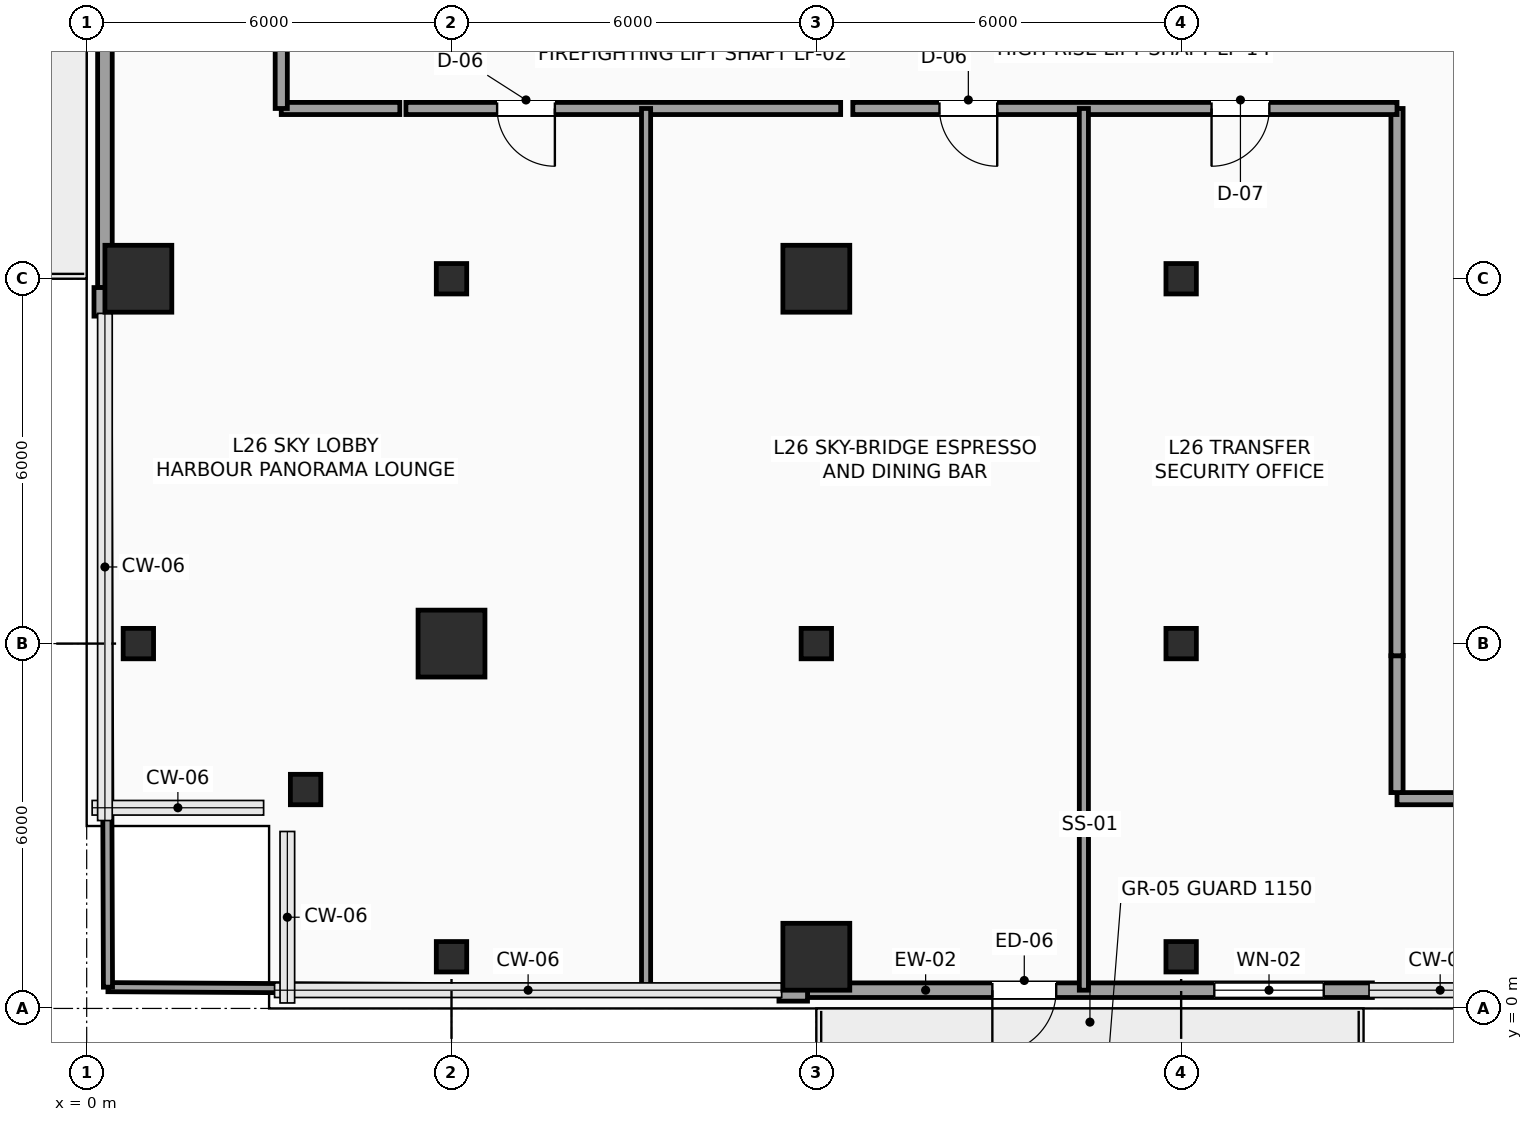
"""IFC4 building model, lengths in metres.
Left out: names, types, materials, properties, quantities, classifications, styles, units other than length and angle.
Written with IfcOpenShell. Run it as: python <this file> out.ifc"""

import sys

from ifc_helpers import new_model, si_unit, direction, frame, frame_2d, origin, origin_2d, place, context, subcontext, project, spatial, rectangle, hollow_rectangle, extrude, element, fill, save


model = new_model("IFC4")
c1 = context("Model", 3, precision=1e-05, world=origin(), true_north=direction((0.0, 1.0)))
c2 = subcontext(c1, "Body", "Model", "MODEL_VIEW")
j1 = project(units=[si_unit("LENGTHUNIT", "METRE"), si_unit("PLANEANGLEUNIT", "RADIAN")], contexts=[c1])
p1 = place(None, origin())
s1 = spatial("IfcSite", under=j1, at=p1, CompositionType="ELEMENT")
p2 = place(p1, origin())
s2 = spatial("IfcBuilding", under=s1, at=p2, CompositionType="ELEMENT")
p3 = place(p2, frame((0.0, 0.0, 110.85)))
s3 = spatial("IfcBuildingStorey", under=s2, at=p3, CompositionType="ELEMENT", Elevation=110.85)
for number, where, z_axis, x_axis in (
    (1, (3.6, 3.6, 0.0), (0.0, 0.0, 1.0), (1.0, 0.0, 0.0)),
    (2, (0.85, 6.0, 0.0), (0.0, 0.0, 1.0), (1.0, 0.0, 0.0)),
):
    element("IfcColumn", number, at=place(p3, frame(where, z_axis=z_axis, x_axis=x_axis)), inside=s3, PredefinedType="COLUMN", context=c2, shape_type="SweptSolid", body=[
        extrude(hollow_rectangle(XDim=0.5, YDim=0.5, WallThickness=0.025, InnerFilletRadius=0.025, OuterFilletRadius=0.04, at=origin_2d()), origin(), (0.0, 0.0, 1.0), 4.8),
    ])
p4 = place(p3, frame((0.85, 12.0, 0.0), z_axis=(0.0, 0.0, 1.0), x_axis=(1.0, 0.0, 0.0)))
e3 = element("IfcColumn", 3, at=p4, inside=s3, PredefinedType="COLUMN", context=c2, shape_type="SweptSolid", body=[
    extrude(rectangle(XDim=1.1, YDim=1.1, at=origin_2d()), origin(), (0.0, 0.0, 1.0), 4.8),
])
p5 = place(p3, frame((6.0, 0.85, 0.0), z_axis=(0.0, 0.0, 1.0), x_axis=(1.0, 0.0, 0.0)))
e4 = element("IfcColumn", 4, at=p5, inside=s3, PredefinedType="COLUMN", context=c2, shape_type="SweptSolid", body=[
    extrude(hollow_rectangle(XDim=0.5, YDim=0.5, WallThickness=0.025, InnerFilletRadius=0.025, OuterFilletRadius=0.04, at=origin_2d()), origin(), (0.0, 0.0, 1.0), 4.8),
])
p6 = place(p3, frame((6.0, 6.0, 0.0), z_axis=(0.0, 0.0, 1.0), x_axis=(1.0, 0.0, 0.0)))
e5 = element("IfcColumn", 5, at=p6, inside=s3, PredefinedType="COLUMN", context=c2, shape_type="SweptSolid", body=[
    extrude(rectangle(XDim=1.1, YDim=1.1, at=origin_2d()), origin(), (0.0, 0.0, 1.0), 4.8),
])
p7 = place(p3, frame((6.0, 12.0, 0.0), z_axis=(0.0, 0.0, 1.0), x_axis=(1.0, 0.0, 0.0)))
e6 = element("IfcColumn", 6, at=p7, inside=s3, PredefinedType="COLUMN", context=c2, shape_type="SweptSolid", body=[
    extrude(hollow_rectangle(XDim=0.5, YDim=0.5, WallThickness=0.025, InnerFilletRadius=0.025, OuterFilletRadius=0.04, at=origin_2d()), origin(), (0.0, 0.0, 1.0), 4.8),
])
p8 = place(p3, frame((12.0, 0.85, 0.0), z_axis=(0.0, 0.0, 1.0), x_axis=(1.0, 0.0, 0.0)))
e7 = element("IfcColumn", 7, at=p8, inside=s3, PredefinedType="COLUMN", context=c2, shape_type="SweptSolid", body=[
    extrude(rectangle(XDim=1.1, YDim=1.1, at=origin_2d()), origin(), (0.0, 0.0, 1.0), 4.8),
])
p9 = place(p3, frame((12.0, 6.0, 0.0), z_axis=(0.0, 0.0, 1.0), x_axis=(1.0, 0.0, 0.0)))
e8 = element("IfcColumn", 8, at=p9, inside=s3, PredefinedType="COLUMN", context=c2, shape_type="SweptSolid", body=[
    extrude(hollow_rectangle(XDim=0.5, YDim=0.5, WallThickness=0.025, InnerFilletRadius=0.025, OuterFilletRadius=0.04, at=origin_2d()), origin(), (0.0, 0.0, 1.0), 4.8),
])
p10 = place(p3, frame((12.0, 12.0, 0.0), z_axis=(0.0, 0.0, 1.0), x_axis=(1.0, 0.0, 0.0)))
e9 = element("IfcColumn", 9, at=p10, inside=s3, PredefinedType="COLUMN", context=c2, shape_type="SweptSolid", body=[
    extrude(rectangle(XDim=1.1, YDim=1.1, at=origin_2d()), origin(), (0.0, 0.0, 1.0), 4.8),
])
for number, where, z_axis, x_axis in (
    (10, (18.0, 0.85, 0.0), (0.0, 0.0, 1.0), (1.0, 0.0, 0.0)),
    (11, (18.0, 6.0, 0.0), (0.0, 0.0, 1.0), (1.0, 0.0, 0.0)),
    (12, (18.0, 12.0, 0.0), (0.0, 0.0, 1.0), (1.0, 0.0, 0.0)),
):
    element("IfcColumn", number, at=place(p3, frame(where, z_axis=z_axis, x_axis=x_axis)), inside=s3, PredefinedType="COLUMN", context=c2, shape_type="SweptSolid", body=[
        extrude(hollow_rectangle(XDim=0.5, YDim=0.5, WallThickness=0.025, InnerFilletRadius=0.025, OuterFilletRadius=0.04, at=origin_2d()), origin(), (0.0, 0.0, 1.0), 4.8),
    ])
p11 = place(p3, frame((21.145, 0.3, 0.0), z_axis=(0.0, 0.0, 1.0), x_axis=(-1.0, 0.0, 0.0)))
e13 = element("IfcWall", 13, at=p11, inside=s3, PredefinedType="SOLIDWALL", context=c2, shape_type="SweptSolid", body=[
    extrude(rectangle(XDim=9.29, YDim=0.24, at=frame_2d((4.645, 0.0))), origin(), (0.0, 0.0, 1.0), 4.575),
])
p12 = place(p11, frame((5.2, 0.0, 0.0)))
e14 = element("IfcOpeningElement", 14, at=p12, cuts=e13, PredefinedType="OPENING", context=c2, shape_type="SweptSolid", body=[
    extrude(rectangle(XDim=1.05, YDim=2.2, at=frame_2d((0.525, 1.1))), frame((0.0, 0.13, 0.0), z_axis=(0.0, -1.0, 0.0), x_axis=(1.0, 0.0, 0.0)), (0.0, 0.0, 1.0), 0.26),
])
p13 = place(p11, frame((0.8, 0.0, 0.85)))
e15 = element("IfcOpeningElement", 15, at=p13, cuts=e13, PredefinedType="OPENING", context=c2, shape_type="SweptSolid", body=[
    extrude(rectangle(XDim=1.8, YDim=2.1, at=frame_2d((0.9, 1.05))), frame((0.0, 0.13, 0.0), z_axis=(0.0, -1.0, 0.0), x_axis=(1.0, 0.0, 0.0)), (0.0, 0.0, 1.0), 0.26),
])
p14 = place(p3, frame((0.3, 11.855, 0.0), z_axis=(0.0, 0.0, 1.0), x_axis=(0.0, 1.0, 0.0)))
e16 = element("IfcWall", 16, at=p14, inside=s3, PredefinedType="SOLIDWALL", context=c2, shape_type="SweptSolid", body=[
    extrude(rectangle(XDim=9.29, YDim=0.24, at=frame_2d((4.645, 0.0))), origin(), (0.0, 0.0, 1.0), 4.575),
])
p15 = place(p14, frame((3.945, 0.0, 0.0)))
e17 = element("IfcOpeningElement", 17, at=p15, cuts=e16, PredefinedType="OPENING", context=c2, shape_type="SweptSolid", body=[
    extrude(rectangle(XDim=1.05, YDim=2.2, at=frame_2d((0.525, 1.1))), frame((0.0, 0.13, 0.0), z_axis=(0.0, -1.0, 0.0), x_axis=(1.0, 0.0, 0.0)), (0.0, 0.0, 1.0), 0.26),
])
p16 = place(p14, frame((6.8, 0.0, 0.85)))
e18 = element("IfcOpeningElement", 18, at=p16, cuts=e16, PredefinedType="OPENING", context=c2, shape_type="SweptSolid", body=[
    extrude(rectangle(XDim=1.8, YDim=2.1, at=frame_2d((0.9, 1.05))), frame((0.0, 0.13, 0.0), z_axis=(0.0, -1.0, 0.0), x_axis=(1.0, 0.0, 0.0)), (0.0, 0.0, 1.0), 0.26),
])
for number, where, z_axis, x_axis in (
    (19, (0.24, 11.385, 0.0), (0.0, 0.0, 1.0), (0.0, 1.0, 0.0)),
    (20, (11.855, 0.24, 0.0), (0.0, 0.0, 1.0), (-1.0, 0.0, 0.0)),
):
    element("IfcWall", number, at=place(p3, frame(where, z_axis=z_axis, x_axis=x_axis)), inside=s3, PredefinedType="SOLIDWALL", context=c2, shape_type="SweptSolid", body=[
        extrude(rectangle(XDim=0.47, YDim=0.24, at=frame_2d((0.235, 0.0))), origin(), (0.0, 0.0, 1.0), 4.575),
    ])
p17 = place(p3, frame((36.15, 3.45, 0.0), z_axis=(0.0, 0.0, 1.0), x_axis=(-1.0, 0.0, 0.0)))
e21 = element("IfcWall", 21, at=p17, inside=s3, PredefinedType="PARTITIONING", context=c2, shape_type="SweptSolid", body=[
    extrude(rectangle(XDim=14.6, YDim=0.2, at=frame_2d((7.3, 0.0))), origin(), (0.0, 0.0, 1.0), 4.117),
])
p18 = place(p3, frame((21.55, 3.55, 0.0), z_axis=(0.0, 0.0, 1.0), x_axis=(0.0, 1.0, 0.0)))
e22 = element("IfcWall", 22, at=p18, inside=s3, PredefinedType="PARTITIONING", context=c2, shape_type="SweptSolid", body=[
    extrude(rectangle(XDim=2.25, YDim=0.2, at=frame_2d((1.125, 0.0))), origin(), (0.0, 0.0, 1.0), 4.575),
])
p19 = place(p3, frame((21.55, 5.8, 0.0), z_axis=(0.0, 0.0, 1.0), x_axis=(0.0, 1.0, 0.0)))
e23 = element("IfcWall", 23, at=p19, inside=s3, PredefinedType="PARTITIONING", context=c2, shape_type="SweptSolid", body=[
    extrude(rectangle(XDim=9.0, YDim=0.2, at=frame_2d((4.5, 0.0))), origin(), (0.0, 0.0, 1.0), 4.575),
])
p20 = place(p3, frame((21.55, 14.8, 0.0), z_axis=(0.0, 0.0, 1.0), x_axis=(-1.0, 0.0, 0.0)))
e24 = element("IfcWall", 24, at=p20, inside=s3, PredefinedType="PARTITIONING", context=c2, shape_type="SweptSolid", body=[
    extrude(rectangle(XDim=8.95, YDim=0.2, at=frame_2d((4.475, 0.0))), origin(), (0.0, 0.0, 1.0), 4.117),
])
p21 = place(p20, frame((6.575, 0.0, 0.0)))
e25 = element("IfcOpeningElement", 25, at=p21, cuts=e24, PredefinedType="OPENING", context=c2, shape_type="SweptSolid", body=[
    extrude(rectangle(XDim=0.95, YDim=2.15, at=frame_2d((0.475, 1.075))), frame((0.0, 0.11, 0.0), z_axis=(0.0, -1.0, 0.0), x_axis=(1.0, 0.0, 0.0)), (0.0, 0.0, 1.0), 0.22),
])
p22 = place(p20, frame((2.1, 0.0, 0.0)))
e26 = element("IfcOpeningElement", 26, at=p22, cuts=e24, PredefinedType="OPENING", context=c2, shape_type="SweptSolid", body=[
    extrude(rectangle(XDim=0.95, YDim=2.15, at=frame_2d((0.475, 1.075))), frame((0.0, 0.11, 0.0), z_axis=(0.0, -1.0, 0.0), x_axis=(1.0, 0.0, 0.0)), (0.0, 0.0, 1.0), 0.22),
])
p23 = place(p3, frame((12.4, 14.8, 0.0), z_axis=(0.0, 0.0, 1.0), x_axis=(-1.0, 0.0, 0.0)))
e27 = element("IfcWall", 27, at=p23, inside=s3, PredefinedType="PARTITIONING", context=c2, shape_type="SweptSolid", body=[
    extrude(rectangle(XDim=7.15, YDim=0.2, at=frame_2d((3.575, 0.0))), origin(), (0.0, 0.0, 1.0), 4.117),
])
p24 = place(p23, frame((4.7, 0.0, 0.0)))
e28 = element("IfcOpeningElement", 28, at=p24, cuts=e27, PredefinedType="OPENING", context=c2, shape_type="SweptSolid", body=[
    extrude(rectangle(XDim=0.95, YDim=2.15, at=frame_2d((0.475, 1.075))), frame((0.0, 0.11, 0.0), z_axis=(0.0, -1.0, 0.0), x_axis=(1.0, 0.0, 0.0)), (0.0, 0.0, 1.0), 0.22),
])
p25 = place(p3, frame((5.15, 14.8, 0.0), z_axis=(0.0, 0.0, 1.0), x_axis=(-1.0, 0.0, 0.0)))
e29 = element("IfcWall", 29, at=p25, inside=s3, PredefinedType="PARTITIONING", context=c2, shape_type="SweptSolid", body=[
    extrude(rectangle(XDim=1.95, YDim=0.2, at=frame_2d((0.975, 0.0))), origin(), (0.0, 0.0, 1.0), 4.117),
])
p26 = place(p3, frame((3.2, 14.8, 0.0), z_axis=(0.0, 0.0, 1.0), x_axis=(0.0, 1.0, 0.0)))
e30 = element("IfcWall", 30, at=p26, inside=s3, PredefinedType="PARTITIONING", context=c2, shape_type="SweptSolid", body=[
    extrude(rectangle(XDim=15.45, YDim=0.2, at=frame_2d((7.725, 0.0))), origin(), (0.0, 0.0, 1.0), 4.575),
])
p27 = place(p3, frame((0.35, 0.35, 0.0), z_axis=(0.0, 0.0, 1.0), x_axis=(0.999984009014, -0.005655237989, 0.0)))
e31 = element("IfcWall", 31, at=p27, inside=s3, PredefinedType="PARTITIONING", context=c2, shape_type="SweptSolid", body=[
    extrude(rectangle(XDim=8.85, YDim=0.15, at=frame_2d((4.425, 0.0))), origin(), (0.0, 0.0, 1.0), 4.575),
])
p28 = place(p3, frame((0.35, 0.35, 0.0), z_axis=(0.0, 0.0, 1.0), x_axis=(-0.003473507221, 0.999993967356, 0.0)))
e32 = element("IfcWall", 32, at=p28, inside=s3, PredefinedType="PARTITIONING", context=c2, shape_type="SweptSolid", body=[
    extrude(rectangle(XDim=11.035, YDim=0.15, at=frame_2d((5.518, 0.0))), origin(), (0.0, 0.0, 1.0), 4.575),
])
for number, where, z_axis, x_axis in (
    (33, (9.2, 0.3, 0.0), (0.0, 0.0, 1.0), (0.0, 1.0, 0.0)),
    (34, (16.4, 0.3, 0.0), (0.0, 0.0, 1.0), (0.0, 1.0, 0.0)),
):
    element("IfcWall", number, at=place(p3, frame(where, z_axis=z_axis, x_axis=x_axis)), inside=s3, PredefinedType="PARTITIONING", context=c2, shape_type="SweptSolid", body=[
        extrude(rectangle(XDim=14.5, YDim=0.15, at=frame_2d((7.25, 0.0))), origin(), (0.0, 0.0, 1.0), 4.575),
    ])
p29 = place(p12, origin())
e35 = element("IfcDoor", 35, at=p29, inside=s3, OperationType="SINGLE_SWING_RIGHT", PredefinedType="DOOR", context=c2, shape_type="SweptSolid", body=[
    extrude(rectangle(XDim=1.05, YDim=2.2, at=frame_2d((0.525, 1.1))), frame((0.0, 0.025, 0.0), z_axis=(0.0, -1.0, 0.0), x_axis=(1.0, 0.0, 0.0)), (0.0, 0.0, 1.0), 0.05),
])
fill(e14, e35)
p30 = place(p13, origin())
e36 = element("IfcWindow", 36, at=p30, inside=s3, PartitioningType="SINGLE_PANEL", PredefinedType="WINDOW", context=c2, shape_type="SweptSolid", body=[
    extrude(rectangle(XDim=1.8, YDim=2.1, at=frame_2d((0.9, 1.05))), frame((0.0, 0.03, 0.0), z_axis=(0.0, -1.0, 0.0), x_axis=(1.0, 0.0, 0.0)), (0.0, 0.0, 1.0), 0.06),
])
fill(e15, e36)
p31 = place(p21, origin())
e37 = element("IfcDoor", 37, at=p31, inside=s3, OperationType="SINGLE_SWING_LEFT", PredefinedType="DOOR", context=c2, shape_type="SweptSolid", body=[
    extrude(rectangle(XDim=0.95, YDim=2.15, at=frame_2d((0.475, 1.075))), frame((0.0, 0.025, 0.0), z_axis=(0.0, -1.0, 0.0), x_axis=(1.0, 0.0, 0.0)), (0.0, 0.0, 1.0), 0.05),
])
fill(e25, e37)
p32 = place(p22, origin())
e38 = element("IfcDoor", 38, at=p32, inside=s3, OperationType="SINGLE_SWING_RIGHT", PredefinedType="DOOR", context=c2, shape_type="SweptSolid", body=[
    extrude(rectangle(XDim=0.95, YDim=2.15, at=frame_2d((0.475, 1.075))), frame((0.0, 0.025, 0.0), z_axis=(0.0, -1.0, 0.0), x_axis=(1.0, 0.0, 0.0)), (0.0, 0.0, 1.0), 0.05),
])
fill(e26, e38)
p33 = place(p24, origin())
e39 = element("IfcDoor", 39, at=p33, inside=s3, OperationType="SINGLE_SWING_LEFT", PredefinedType="DOOR", context=c2, shape_type="SweptSolid", body=[
    extrude(rectangle(XDim=0.95, YDim=2.15, at=frame_2d((0.475, 1.075))), frame((0.0, 0.025, 0.0), z_axis=(0.0, -1.0, 0.0), x_axis=(1.0, 0.0, 0.0)), (0.0, 0.0, 1.0), 0.05),
])
fill(e28, e39)
save(model, sys.argv[1])
